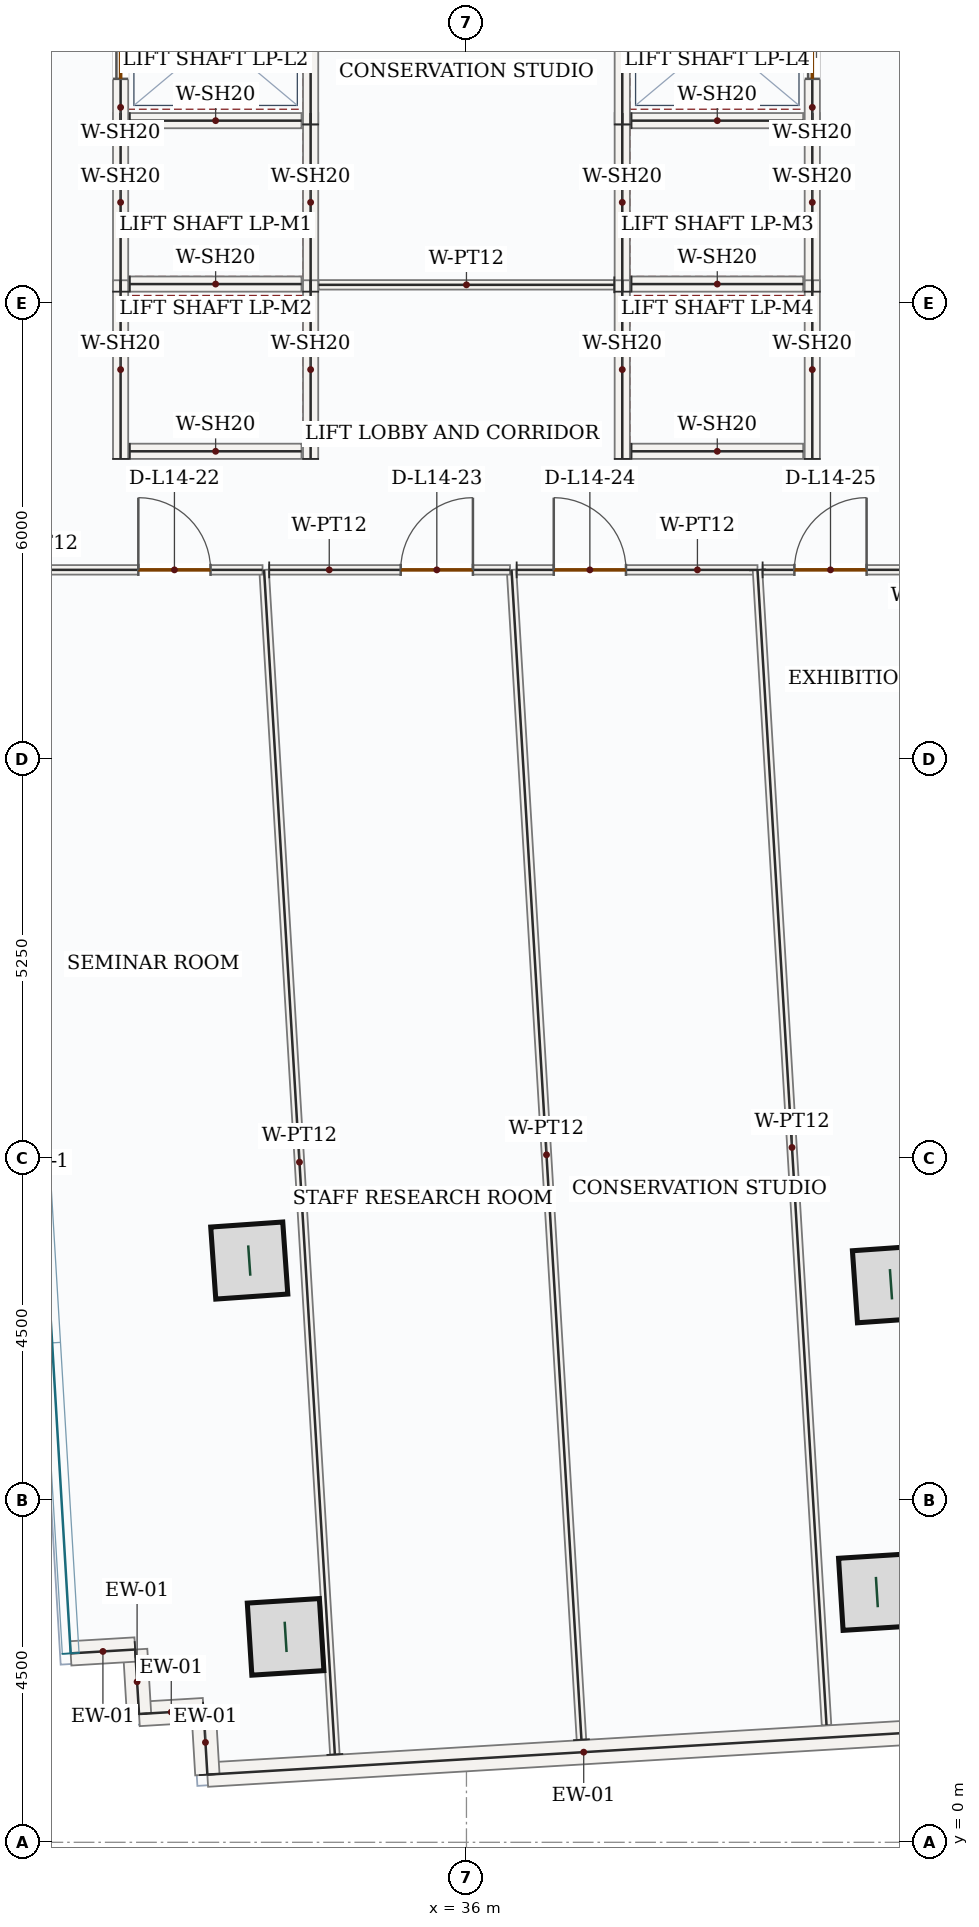
"""IFC4 building model, lengths in metres.
Left out: names, types, materials, properties, quantities, classifications, styles, units other than length and angle.
Written with IfcOpenShell. Run it as: python <this file> out.ifc"""

import sys

from ifc_helpers import new_model, si_unit, direction, frame, frame_2d, origin, origin_2d, place, context, subcontext, project, spatial, rectangle, hollow_rectangle, extrude, source, transform, mapped, element, fill, save


model = new_model("IFC4")
c1 = context("Model", 3, precision=1e-05, world=origin(), true_north=direction((0.0, 1.0)))
c2 = subcontext(c1, "Body", "Model", "MODEL_VIEW")
j1 = project(units=[si_unit("LENGTHUNIT", "METRE"), si_unit("PLANEANGLEUNIT", "RADIAN")], contexts=[c1])
p1 = place(None, origin())
s1 = spatial("IfcSite", under=j1, at=p1, CompositionType="ELEMENT")
p2 = place(p1, origin())
s2 = spatial("IfcBuilding", under=s1, at=p2, CompositionType="ELEMENT")
p3 = place(p2, frame((0.0, 0.0, 66.9)))
s3 = spatial("IfcBuildingStorey", under=s2, at=p3, CompositionType="ELEMENT", Elevation=66.9)
m1 = source(origin(), c2, "Body", "SweptSolid", [
    extrude(hollow_rectangle(XDim=0.95, YDim=0.95, WallThickness=0.05, at=origin_2d()), origin(), (0.0, 0.0, 1.0), 4.2),
])
for number, where, z_axis, x_axis in (
    (1, (33.143, 7.654, 0.0), (0.0, 0.0, 1.0), (-0.07, 0.998, 0.0)),
    (2, (41.585, 7.342, 0.0), (0.0, 0.0, 1.0), (-0.07, 0.998, 0.0)),
    (3, (33.621, 2.703, 0.0), (0.0, 0.0, 1.0), (-0.063, 0.998, 0.0)),
    (4, (41.399, 3.292, 0.0), (0.0, 0.0, 1.0), (-0.063, 0.998, 0.0)),
):
    element("IfcColumn", number, at=place(p3, frame(where, z_axis=z_axis, x_axis=x_axis)), inside=s3, PredefinedType="COLUMN", context=c2, shape_type="MappedRepresentation", body=[
        mapped(m1, transform((0.0, 0.0, 0.0), x_axis=(1.0, 0.0, 0.0), y_axis=(0.0, 1.0, 0.0), z_axis=(0.0, 0.0, 1.0), scale=1.0)),
    ])
m2 = source(origin(), c2, "Body", "SweptSolid", [
    extrude(rectangle(XDim=9.92, YDim=0.32, at=frame_2d((4.96, 0.0))), origin(), (0.0, 0.0, 1.0), 3.95),
])
p4 = place(p3, frame((42.494, 1.482, 0.0), z_axis=(0.0, 0.0, 1.0), x_axis=(-0.998218942745, -0.059656871726, 0.0)))
e5 = element("IfcWall", 5, at=p4, inside=s3, PredefinedType="SOLIDWALL", context=c2, shape_type="MappedRepresentation", body=[
    mapped(m2, transform((0.0, 0.0, 0.0), x_axis=(1.0, 0.0, 0.0), y_axis=(0.0, 1.0, 0.0), z_axis=(0.0, 0.0, 1.0), scale=1.0)),
])
m3 = source(origin(), c2, "Body", "SweptSolid", [
    extrude(rectangle(XDim=0.85, YDim=0.32, at=frame_2d((0.425, 0.0))), origin(), (0.0, 0.0, 1.0), 3.95),
])
p5 = place(p3, frame((32.592, 0.89, 0.0), z_axis=(0.0, 0.0, 1.0), x_axis=(-0.059732049764, 0.998214447016, 0.0)))
e6 = element("IfcWall", 6, at=p5, inside=s3, PredefinedType="SOLIDWALL", context=c2, shape_type="MappedRepresentation", body=[
    mapped(m3, transform((0.0, 0.0, 0.0), x_axis=(1.0, 0.0, 0.0), y_axis=(0.0, 1.0, 0.0), z_axis=(0.0, 0.0, 1.0), scale=1.0)),
])
m4 = source(origin(), c2, "Body", "SweptSolid", [
    extrude(rectangle(XDim=0.85, YDim=0.32, at=frame_2d((0.425, 0.0))), origin(), (0.0, 0.0, 1.0), 3.95),
])
for number, where, z_axis, x_axis in (
    (7, (32.541, 1.739, 0.0), (0.0, 0.0, 1.0), (-0.998, -0.06, 0.0)),
    (8, (31.692, 1.688, 0.0), (0.0, 0.0, 1.0), (-0.06, 0.998, 0.0)),
    (9, (31.642, 2.536, 0.0), (0.0, 0.0, 1.0), (-0.998, -0.06, 0.0)),
):
    element("IfcWall", number, at=place(p3, frame(where, z_axis=z_axis, x_axis=x_axis)), inside=s3, PredefinedType="SOLIDWALL", context=c2, shape_type="MappedRepresentation", body=[
        mapped(m4, transform((0.0, 0.0, 0.0), x_axis=(1.0, 0.0, 0.0), y_axis=(0.0, 1.0, 0.0), z_axis=(0.0, 0.0, 1.0), scale=1.0)),
    ])
m5 = source(origin(), c2, "Body", "SweptSolid", [
    extrude(rectangle(XDim=2.35, YDim=0.2, at=frame_2d((1.175, 0.0))), origin(), (0.0, 0.0, 1.0), 3.95),
])
for number, where, z_axis, x_axis in (
    (10, (31.45, 20.4, 0.0), (0.0, 0.0, 1.0), (0.0, 1.0, 0.0)),
    (11, (33.95, 20.4, 0.0), (0.0, 0.0, 1.0), (0.0, 1.0, 0.0)),
):
    element("IfcWall", number, at=place(p3, frame(where, z_axis=z_axis, x_axis=x_axis)), inside=s3, PredefinedType="SOLIDWALL", context=c2, shape_type="MappedRepresentation", body=[
        mapped(m5, transform((0.0, 0.0, 0.0), x_axis=(1.0, 0.0, 0.0), y_axis=(0.0, 1.0, 0.0), z_axis=(0.0, 0.0, 1.0), scale=1.0)),
    ])
m6 = source(origin(), c2, "Body", "SweptSolid", [
    extrude(rectangle(XDim=2.26, YDim=0.2, at=frame_2d((1.13, 0.0))), origin(), (0.0, 0.0, 1.0), 3.95),
])
for number, where, z_axis, x_axis in (
    (12, (31.57, 20.5, 0.0), (0.0, 0.0, 1.0), (1.0, 0.0, 0.0)),
    (13, (31.57, 22.65, 0.0), (0.0, 0.0, 1.0), (1.0, 0.0, 0.0)),
):
    element("IfcWall", number, at=place(p3, frame(where, z_axis=z_axis, x_axis=x_axis)), inside=s3, PredefinedType="SOLIDWALL", context=c2, shape_type="MappedRepresentation", body=[
        mapped(m6, transform((0.0, 0.0, 0.0), x_axis=(1.0, 0.0, 0.0), y_axis=(0.0, 1.0, 0.0), z_axis=(0.0, 0.0, 1.0), scale=1.0)),
    ])
for number, where, z_axis, x_axis in (
    (14, (31.45, 18.2, 0.0), (0.0, 0.0, 1.0), (0.0, 1.0, 0.0)),
    (15, (33.95, 18.2, 0.0), (0.0, 0.0, 1.0), (0.0, 1.0, 0.0)),
):
    element("IfcWall", number, at=place(p3, frame(where, z_axis=z_axis, x_axis=x_axis)), inside=s3, PredefinedType="SOLIDWALL", context=c2, shape_type="MappedRepresentation", body=[
        mapped(m5, transform((0.0, 0.0, 0.0), x_axis=(1.0, 0.0, 0.0), y_axis=(0.0, 1.0, 0.0), z_axis=(0.0, 0.0, 1.0), scale=1.0)),
    ])
p6 = place(p3, frame((31.57, 18.3, 0.0), z_axis=(0.0, 0.0, 1.0), x_axis=(1.0, 0.0, 0.0)))
e16 = element("IfcWall", 16, at=p6, inside=s3, PredefinedType="SOLIDWALL", context=c2, shape_type="MappedRepresentation", body=[
    mapped(m6, transform((0.0, 0.0, 0.0), x_axis=(1.0, 0.0, 0.0), y_axis=(0.0, 1.0, 0.0), z_axis=(0.0, 0.0, 1.0), scale=1.0)),
])
for number, where, z_axis, x_axis in (
    (17, (38.05, 20.4, 0.0), (0.0, 0.0, 1.0), (0.0, 1.0, 0.0)),
    (18, (40.55, 20.4, 0.0), (0.0, 0.0, 1.0), (0.0, 1.0, 0.0)),
):
    element("IfcWall", number, at=place(p3, frame(where, z_axis=z_axis, x_axis=x_axis)), inside=s3, PredefinedType="SOLIDWALL", context=c2, shape_type="MappedRepresentation", body=[
        mapped(m5, transform((0.0, 0.0, 0.0), x_axis=(1.0, 0.0, 0.0), y_axis=(0.0, 1.0, 0.0), z_axis=(0.0, 0.0, 1.0), scale=1.0)),
    ])
for number, where, z_axis, x_axis in (
    (19, (38.17, 20.5, 0.0), (0.0, 0.0, 1.0), (1.0, 0.0, 0.0)),
    (20, (38.17, 22.65, 0.0), (0.0, 0.0, 1.0), (1.0, 0.0, 0.0)),
):
    element("IfcWall", number, at=place(p3, frame(where, z_axis=z_axis, x_axis=x_axis)), inside=s3, PredefinedType="SOLIDWALL", context=c2, shape_type="MappedRepresentation", body=[
        mapped(m6, transform((0.0, 0.0, 0.0), x_axis=(1.0, 0.0, 0.0), y_axis=(0.0, 1.0, 0.0), z_axis=(0.0, 0.0, 1.0), scale=1.0)),
    ])
for number, where, z_axis, x_axis in (
    (21, (38.05, 18.2, 0.0), (0.0, 0.0, 1.0), (0.0, 1.0, 0.0)),
    (22, (40.55, 18.2, 0.0), (0.0, 0.0, 1.0), (0.0, 1.0, 0.0)),
):
    element("IfcWall", number, at=place(p3, frame(where, z_axis=z_axis, x_axis=x_axis)), inside=s3, PredefinedType="SOLIDWALL", context=c2, shape_type="MappedRepresentation", body=[
        mapped(m5, transform((0.0, 0.0, 0.0), x_axis=(1.0, 0.0, 0.0), y_axis=(0.0, 1.0, 0.0), z_axis=(0.0, 0.0, 1.0), scale=1.0)),
    ])
p7 = place(p3, frame((38.17, 18.3, 0.0), z_axis=(0.0, 0.0, 1.0), x_axis=(1.0, 0.0, 0.0)))
e23 = element("IfcWall", 23, at=p7, inside=s3, PredefinedType="SOLIDWALL", context=c2, shape_type="MappedRepresentation", body=[
    mapped(m6, transform((0.0, 0.0, 0.0), x_axis=(1.0, 0.0, 0.0), y_axis=(0.0, 1.0, 0.0), z_axis=(0.0, 0.0, 1.0), scale=1.0)),
])
p8 = place(p3, frame((31.45, 22.6, 0.0), z_axis=(0.0, 0.0, 1.0), x_axis=(0.0, 1.0, 0.0)))
e24 = element("IfcWall", 24, at=p8, inside=s3, PredefinedType="SOLIDWALL", context=c2, shape_type="SweptSolid", body=[
    extrude(rectangle(XDim=2.3, YDim=0.2, at=frame_2d((1.15, 0.0))), origin(), (0.0, 0.0, 1.0), 3.95),
])
p9 = place(p8, frame((0.6, 0.0, 0.0)))
e25 = element("IfcOpeningElement", 25, at=p9, cuts=e24, PredefinedType="OPENING", context=c2, shape_type="SweptSolid", body=[
    extrude(rectangle(XDim=1.1, YDim=2.15, at=frame_2d((0.55, 1.075))), frame((0.0, 0.11, 0.0), z_axis=(0.0, -1.0, 0.0), x_axis=(1.0, 0.0, 0.0)), (0.0, 0.0, 1.0), 0.22),
])
m7 = source(origin(), c2, "Body", "SweptSolid", [
    extrude(rectangle(XDim=2.3, YDim=0.2, at=frame_2d((1.15, 0.0))), origin(), (0.0, 0.0, 1.0), 3.95),
])
for number, where, z_axis, x_axis in (
    (26, (33.95, 22.6, 0.0), (0.0, 0.0, 1.0), (0.0, 1.0, 0.0)),
    (27, (38.05, 22.6, 0.0), (0.0, 0.0, 1.0), (0.0, 1.0, 0.0)),
):
    element("IfcWall", number, at=place(p3, frame(where, z_axis=z_axis, x_axis=x_axis)), inside=s3, PredefinedType="SOLIDWALL", context=c2, shape_type="MappedRepresentation", body=[
        mapped(m7, transform((0.0, 0.0, 0.0), x_axis=(1.0, 0.0, 0.0), y_axis=(0.0, 1.0, 0.0), z_axis=(0.0, 0.0, 1.0), scale=1.0)),
    ])
p10 = place(p3, frame((40.55, 22.6, 0.0), z_axis=(0.0, 0.0, 1.0), x_axis=(0.0, 1.0, 0.0)))
e28 = element("IfcWall", 28, at=p10, inside=s3, PredefinedType="SOLIDWALL", context=c2, shape_type="SweptSolid", body=[
    extrude(rectangle(XDim=2.3, YDim=0.2, at=frame_2d((1.15, 0.0))), origin(), (0.0, 0.0, 1.0), 3.95),
])
p11 = place(p10, frame((0.6, 0.0, 0.0)))
e29 = element("IfcOpeningElement", 29, at=p11, cuts=e28, PredefinedType="OPENING", context=c2, shape_type="SweptSolid", body=[
    extrude(rectangle(XDim=1.1, YDim=2.15, at=frame_2d((0.55, 1.075))), frame((0.0, 0.11, 0.0), z_axis=(0.0, -1.0, 0.0), x_axis=(1.0, 0.0, 0.0)), (0.0, 0.0, 1.0), 0.22),
])
m8 = source(origin(), c2, "Body", "SweptSolid", [
    extrude(rectangle(XDim=3.89, YDim=0.125, at=frame_2d((1.945, 0.0))), origin(), (0.0, 0.0, 1.0), 3.95),
])
p12 = place(p3, frame((37.945, 20.49, 0.0), z_axis=(0.0, 0.0, 1.0), x_axis=(-1.0, 0.0, 0.0)))
e30 = element("IfcWall", 30, at=p12, inside=s3, PredefinedType="PARTITIONING", context=c2, shape_type="MappedRepresentation", body=[
    mapped(m8, transform((0.0, 0.0, 0.0), x_axis=(1.0, 0.0, 0.0), y_axis=(0.0, 1.0, 0.0), z_axis=(0.0, 0.0, 1.0), scale=1.0)),
])
m9 = source(origin(), c2, "Body", "SweptSolid", [
    extrude(rectangle(XDim=15.418, YDim=0.125, at=frame_2d((7.709, 0.0))), origin(), (0.0, 0.0, 1.0), 3.95),
])
p13 = place(p3, frame((37.513, 1.35, 0.0), z_axis=(0.0, 0.0, 1.0), x_axis=(-0.059666030768, 0.998218395329, 0.0)))
e31 = element("IfcWall", 31, at=p13, inside=s3, PredefinedType="PARTITIONING", context=c2, shape_type="MappedRepresentation", body=[
    mapped(m9, transform((0.0, 0.0, 0.0), x_axis=(1.0, 0.0, 0.0), y_axis=(0.0, 1.0, 0.0), z_axis=(0.0, 0.0, 1.0), scale=1.0)),
])
p14 = place(p3, frame((36.661, 16.74, 0.0), z_axis=(0.0, 0.0, 1.0), x_axis=(1.0, 0.0, 0.0)))
e32 = element("IfcWall", 32, at=p14, inside=s3, PredefinedType="PARTITIONING", context=c2, shape_type="SweptSolid", body=[
    extrude(rectangle(XDim=3.168, YDim=0.125, at=frame_2d((1.584, 0.0))), origin(), (0.0, 0.0, 1.0), 3.95),
])
p15 = place(p14, frame((0.488, 0.0, 0.0)))
e33 = element("IfcOpeningElement", 33, at=p15, cuts=e32, PredefinedType="OPENING", context=c2, shape_type="SweptSolid", body=[
    extrude(rectangle(XDim=0.95, YDim=2.15, at=frame_2d((0.475, 1.075))), frame((0.0, 0.073, 0.0), z_axis=(0.0, -1.0, 0.0), x_axis=(1.0, 0.0, 0.0)), (0.0, 0.0, 1.0), 0.145),
])
m10 = source(origin(), c2, "Body", "SweptSolid", [
    extrude(rectangle(XDim=15.225, YDim=0.125, at=frame_2d((7.612, 0.0))), origin(), (0.0, 0.0, 1.0), 3.95),
])
p16 = place(p3, frame((39.829, 16.74, 0.0), z_axis=(0.0, 0.0, 1.0), x_axis=(0.059652617074, -0.998219197008, 0.0)))
e34 = element("IfcWall", 34, at=p16, inside=s3, PredefinedType="PARTITIONING", context=c2, shape_type="MappedRepresentation", body=[
    mapped(m10, transform((0.0, 0.0, 0.0), x_axis=(1.0, 0.0, 0.0), y_axis=(0.0, 1.0, 0.0), z_axis=(0.0, 0.0, 1.0), scale=1.0)),
])
m11 = source(origin(), c2, "Body", "SweptSolid", [
    extrude(rectangle(XDim=15.612, YDim=0.125, at=frame_2d((7.806, 0.0))), origin(), (0.0, 0.0, 1.0), 3.95),
])
p17 = place(p3, frame((34.269, 1.156, 0.0), z_axis=(0.0, 0.0, 1.0), x_axis=(-0.059658872533, 0.998218823169, 0.0)))
e35 = element("IfcWall", 35, at=p17, inside=s3, PredefinedType="PARTITIONING", context=c2, shape_type="MappedRepresentation", body=[
    mapped(m11, transform((0.0, 0.0, 0.0), x_axis=(1.0, 0.0, 0.0), y_axis=(0.0, 1.0, 0.0), z_axis=(0.0, 0.0, 1.0), scale=1.0)),
])
p18 = place(p3, frame((33.405, 16.74, 0.0), z_axis=(0.0, 0.0, 1.0), x_axis=(1.0, 0.0, 0.0)))
e36 = element("IfcWall", 36, at=p18, inside=s3, PredefinedType="PARTITIONING", context=c2, shape_type="SweptSolid", body=[
    extrude(rectangle(XDim=3.168, YDim=0.125, at=frame_2d((1.584, 0.0))), origin(), (0.0, 0.0, 1.0), 3.95),
])
p19 = place(p18, frame((1.73, 0.0, 0.0)))
e37 = element("IfcOpeningElement", 37, at=p19, cuts=e36, PredefinedType="OPENING", context=c2, shape_type="SweptSolid", body=[
    extrude(rectangle(XDim=0.95, YDim=2.15, at=frame_2d((0.475, 1.075))), frame((0.0, 0.073, 0.0), z_axis=(0.0, -1.0, 0.0), x_axis=(1.0, 0.0, 0.0)), (0.0, 0.0, 1.0), 0.145),
])
p20 = place(p3, frame((29.258, 16.74, 0.0), z_axis=(0.0, 0.0, 1.0), x_axis=(0.999999998192, -6.0135907e-05, 0.0)))
e38 = element("IfcWall", 38, at=p20, inside=s3, PredefinedType="PARTITIONING", context=c2, shape_type="SweptSolid", body=[
    extrude(rectangle(XDim=4.06, YDim=0.125, at=frame_2d((2.03, 0.0))), origin(), (0.0, 0.0, 1.0), 3.95),
])
p21 = place(p20, frame((2.426, 0.0, 0.0)))
e39 = element("IfcOpeningElement", 39, at=p21, cuts=e38, PredefinedType="OPENING", context=c2, shape_type="SweptSolid", body=[
    extrude(rectangle(XDim=0.95, YDim=2.15, at=frame_2d((0.475, 1.075))), frame((0.0, 0.073, 0.0), z_axis=(0.0, -1.0, 0.0), x_axis=(1.0, 0.0, 0.0)), (0.0, 0.0, 1.0), 0.145),
])
p22 = place(p3, frame((39.896, 16.74, 0.0), z_axis=(0.0, 0.0, 1.0), x_axis=(0.999999908279, 0.000428302171, 0.0)))
e40 = element("IfcWall", 40, at=p22, inside=s3, PredefinedType="PARTITIONING", context=c2, shape_type="SweptSolid", body=[
    extrude(rectangle(XDim=2.85, YDim=0.125, at=frame_2d((1.425, 0.0))), origin(), (0.0, 0.0, 1.0), 3.95),
])
p23 = place(p22, frame((0.418, 0.0, 0.0)))
e41 = element("IfcOpeningElement", 41, at=p23, cuts=e40, PredefinedType="OPENING", context=c2, shape_type="SweptSolid", body=[
    extrude(rectangle(XDim=0.95, YDim=2.15, at=frame_2d((0.475, 1.075))), frame((0.0, 0.073, 0.0), z_axis=(0.0, -1.0, 0.0), x_axis=(1.0, 0.0, 0.0)), (0.0, 0.0, 1.0), 0.145),
])
m12 = source(origin(), c2, "Body", "SweptSolid", [
    extrude(rectangle(XDim=1.1, YDim=2.15, at=frame_2d((0.55, 1.075))), frame((0.0, 0.025, 0.0), z_axis=(0.0, -1.0, 0.0), x_axis=(1.0, 0.0, 0.0)), (0.0, 0.0, 1.0), 0.05),
])
p24 = place(p9, origin())
e42 = element("IfcDoor", 42, at=p24, inside=s3, OperationType="DOUBLE_DOOR_SLIDING", PredefinedType="DOOR", context=c2, shape_type="MappedRepresentation", body=[
    mapped(m12, transform((0.0, 0.0, 0.0), x_axis=(1.0, 0.0, 0.0), y_axis=(0.0, 1.0, 0.0), z_axis=(0.0, 0.0, 1.0), scale=1.0)),
])
fill(e25, e42)
p25 = place(p11, origin())
e43 = element("IfcDoor", 43, at=p25, inside=s3, OperationType="DOUBLE_DOOR_SLIDING", PredefinedType="DOOR", context=c2, shape_type="MappedRepresentation", body=[
    mapped(m12, transform((0.0, 0.0, 0.0), x_axis=(1.0, 0.0, 0.0), y_axis=(0.0, 1.0, 0.0), z_axis=(0.0, 0.0, 1.0), scale=1.0)),
])
fill(e29, e43)
m13 = source(origin(), c2, "Body", "SweptSolid", [
    extrude(rectangle(XDim=0.95, YDim=2.15, at=frame_2d((0.475, 1.075))), frame((0.0, 0.025, 0.0), z_axis=(0.0, -1.0, 0.0), x_axis=(1.0, 0.0, 0.0)), (0.0, 0.0, 1.0), 0.05),
])
p26 = place(p21, origin())
e44 = element("IfcDoor", 44, at=p26, inside=s3, OperationType="SINGLE_SWING_LEFT", PredefinedType="DOOR", context=c2, shape_type="MappedRepresentation", body=[
    mapped(m13, transform((0.0, 0.0, 0.0), x_axis=(1.0, 0.0, 0.0), y_axis=(0.0, 1.0, 0.0), z_axis=(0.0, 0.0, 1.0), scale=1.0)),
])
fill(e39, e44)
p27 = place(p19, origin())
e45 = element("IfcDoor", 45, at=p27, inside=s3, OperationType="SINGLE_SWING_RIGHT", PredefinedType="DOOR", context=c2, shape_type="MappedRepresentation", body=[
    mapped(m13, transform((0.0, 0.0, 0.0), x_axis=(1.0, 0.0, 0.0), y_axis=(0.0, 1.0, 0.0), z_axis=(0.0, 0.0, 1.0), scale=1.0)),
])
fill(e37, e45)
p28 = place(p15, origin())
e46 = element("IfcDoor", 46, at=p28, inside=s3, OperationType="SINGLE_SWING_LEFT", PredefinedType="DOOR", context=c2, shape_type="MappedRepresentation", body=[
    mapped(m13, transform((0.0, 0.0, 0.0), x_axis=(1.0, 0.0, 0.0), y_axis=(0.0, 1.0, 0.0), z_axis=(0.0, 0.0, 1.0), scale=1.0)),
])
fill(e33, e46)
p29 = place(p23, origin())
e47 = element("IfcDoor", 47, at=p29, inside=s3, OperationType="SINGLE_SWING_RIGHT", PredefinedType="DOOR", context=c2, shape_type="MappedRepresentation", body=[
    mapped(m13, transform((0.0, 0.0, 0.0), x_axis=(1.0, 0.0, 0.0), y_axis=(0.0, 1.0, 0.0), z_axis=(0.0, 0.0, 1.0), scale=1.0)),
])
fill(e41, e47)
save(model, sys.argv[1])
